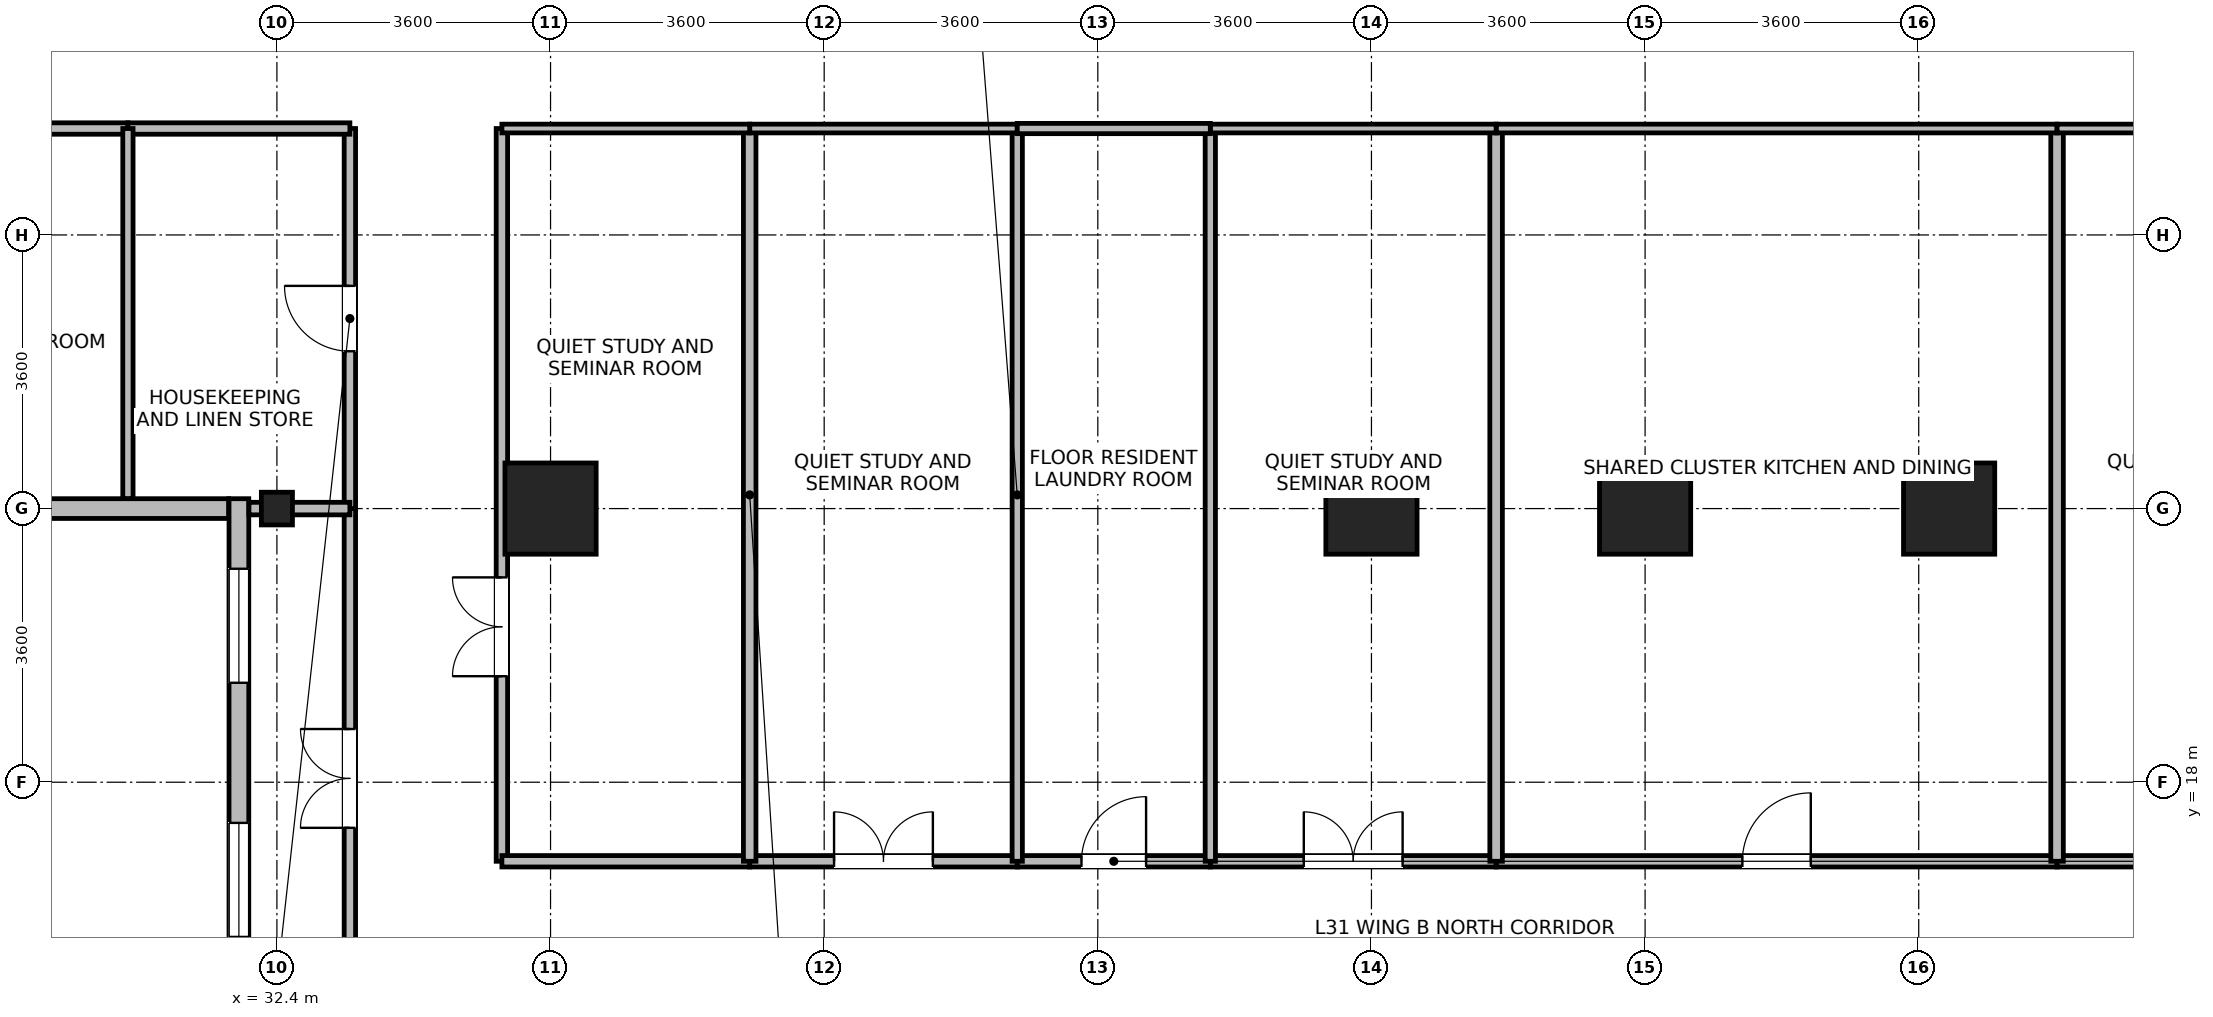
"""IFC4 building model, lengths in metres.
Left out: names, types, materials, properties, quantities, classifications, styles, units other than length and angle.
Written with IfcOpenShell. Run it as: python <this file> out.ifc"""

import sys

from ifc_helpers import new_model, si_unit, direction, frame, frame_2d, origin, origin_2d, place, context, subcontext, project, spatial, rectangle, i_section, extrude, source, transform, mapped, element, fill, save


model = new_model("IFC4")
c1 = context("Model", 3, precision=1e-05, world=origin(), true_north=direction((0.0, 1.0)))
c2 = subcontext(c1, "Body", "Model", "MODEL_VIEW")
j1 = project(units=[si_unit("LENGTHUNIT", "METRE"), si_unit("PLANEANGLEUNIT", "RADIAN")], contexts=[c1])
p1 = place(None, origin())
s1 = spatial("IfcSite", under=j1, at=p1, CompositionType="ELEMENT")
p2 = place(p1, origin())
s2 = spatial("IfcBuilding", under=s1, at=p2, CompositionType="ELEMENT")
p3 = place(p2, frame((0.0, 0.0, 123.0)))
s3 = spatial("IfcBuildingStorey", under=s2, at=p3, CompositionType="ELEMENT", Elevation=123.0)
m1 = source(origin(), c2, "Body", "SweptSolid", [
    extrude(rectangle(XDim=1.2, YDim=1.2, at=origin_2d()), origin(), (0.0, 0.0, 1.0), 3.7),
])
for number, where, z_axis, x_axis in (
    (1, (36.0, 21.6, 0.0), (0.0, 0.0, 1.0), (1.0, 0.0, 0.0)),
    (2, (46.8, 21.6, 0.0), (0.0, 0.0, 1.0), (1.0, 0.0, 0.0)),
    (3, (50.4, 21.6, 0.0), (0.0, 0.0, 1.0), (1.0, 0.0, 0.0)),
    (4, (54.4, 21.6, 0.0), (0.0, 0.0, 1.0), (1.0, 0.0, 0.0)),
):
    element("IfcColumn", number, at=place(p3, frame(where, z_axis=z_axis, x_axis=x_axis)), inside=s3, PredefinedType="COLUMN", context=c2, shape_type="MappedRepresentation", body=[
        mapped(m1, transform((0.0, 0.0, 0.0), x_axis=(1.0, 0.0, 0.0), y_axis=(0.0, 1.0, 0.0), z_axis=(0.0, 0.0, 1.0), scale=1.0)),
    ])
m2 = source(origin(), c2, "Body", "SweptSolid", [
    extrude(i_section(OverallWidth=0.409, OverallDepth=0.43, WebThickness=0.024, FlangeThickness=0.033, FilletRadius=0.015, at=origin_2d()), origin(), (0.0, 0.0, 1.0), 3.7),
])
p4 = place(p3, frame((32.4, 21.6, 0.0), z_axis=(0.0, 0.0, 1.0), x_axis=(1.0, 0.0, 0.0)))
e5 = element("IfcColumn", 5, at=p4, inside=s3, PredefinedType="COLUMN", context=c2, shape_type="MappedRepresentation", body=[
    mapped(m2, transform((0.0, 0.0, 0.0), x_axis=(1.0, 0.0, 0.0), y_axis=(0.0, 1.0, 0.0), z_axis=(0.0, 0.0, 1.0), scale=1.0)),
])
p5 = place(p3, frame((31.765, 21.6, 0.0), z_axis=(0.0, 0.0, 1.0), x_axis=(-1.0, 0.0, 0.0)))
e6 = element("IfcWall", 6, at=p5, inside=s3, PredefinedType="STANDARD", context=c2, shape_type="SweptSolid", body=[
    extrude(rectangle(XDim=2.364, YDim=0.26, at=frame_2d((1.182, 0.0))), origin(), (0.0, 0.0, 1.0), 2.98),
])
p6 = place(p3, frame((31.9, 1.67, 0.0), z_axis=(0.0, 0.0, 1.0), x_axis=(0.0, 1.0, 0.0)))
e7 = element("IfcWall", 7, at=p6, inside=s3, PredefinedType="STANDARD", context=c2, shape_type="SweptSolid", body=[
    extrude(rectangle(XDim=20.06, YDim=0.26, at=frame_2d((10.03, 0.0))), origin(), (0.0, 0.0, 1.0), 3.43),
])
p7 = place(p6, frame((0.922, 0.0, 0.85)))
e8 = element("IfcOpeningElement", 8, at=p7, cuts=e7, PredefinedType="OPENING", context=c2, shape_type="SweptSolid", body=[
    extrude(rectangle(XDim=1.5, YDim=1.85, at=frame_2d((0.75, 0.925))), frame((0.0, 0.14, 0.0), z_axis=(0.0, -1.0, 0.0), x_axis=(1.0, 0.0, 0.0)), (0.0, 0.0, 1.0), 0.28),
])
p8 = place(p6, frame((7.608, 0.0, 0.85)))
e9 = element("IfcOpeningElement", 9, at=p8, cuts=e7, PredefinedType="OPENING", context=c2, shape_type="SweptSolid", body=[
    extrude(rectangle(XDim=1.5, YDim=1.85, at=frame_2d((0.75, 0.925))), frame((0.0, 0.14, 0.0), z_axis=(0.0, -1.0, 0.0), x_axis=(1.0, 0.0, 0.0)), (0.0, 0.0, 1.0), 0.28),
])
p9 = place(p6, frame((10.952, 0.0, 0.85)))
e10 = element("IfcOpeningElement", 10, at=p9, cuts=e7, PredefinedType="OPENING", context=c2, shape_type="SweptSolid", body=[
    extrude(rectangle(XDim=1.5, YDim=1.85, at=frame_2d((0.75, 0.925))), frame((0.0, 0.14, 0.0), z_axis=(0.0, -1.0, 0.0), x_axis=(1.0, 0.0, 0.0)), (0.0, 0.0, 1.0), 0.28),
])
p10 = place(p6, frame((14.295, 0.0, 0.85)))
e11 = element("IfcOpeningElement", 11, at=p10, cuts=e7, PredefinedType="OPENING", context=c2, shape_type="SweptSolid", body=[
    extrude(rectangle(XDim=1.5, YDim=1.85, at=frame_2d((0.75, 0.925))), frame((0.0, 0.14, 0.0), z_axis=(0.0, -1.0, 0.0), x_axis=(1.0, 0.0, 0.0)), (0.0, 0.0, 1.0), 0.28),
])
p11 = place(p6, frame((17.638, 0.0, 0.85)))
e12 = element("IfcOpeningElement", 12, at=p11, cuts=e7, PredefinedType="OPENING", context=c2, shape_type="SweptSolid", body=[
    extrude(rectangle(XDim=1.5, YDim=1.85, at=frame_2d((0.75, 0.925))), frame((0.0, 0.14, 0.0), z_axis=(0.0, -1.0, 0.0), x_axis=(1.0, 0.0, 0.0)), (0.0, 0.0, 1.0), 0.28),
])
p12 = place(p3, frame((35.36, 16.96, 0.0), z_axis=(0.0, 0.0, 1.0), x_axis=(0.0, 1.0, 0.0)))
e13 = element("IfcWall", 13, at=p12, inside=s3, PredefinedType="PARTITIONING", context=c2, shape_type="SweptSolid", body=[
    extrude(rectangle(XDim=9.64, YDim=0.15, at=frame_2d((4.82, 0.0))), origin(), (0.0, 0.0, 1.0), 3.43),
])
p13 = place(p12, frame((2.435, 0.0, 0.0)))
e14 = element("IfcOpeningElement", 14, at=p13, cuts=e13, PredefinedType="OPENING", context=c2, shape_type="SweptSolid", body=[
    extrude(rectangle(XDim=1.3, YDim=2.12, at=frame_2d((0.65, 1.06))), frame((0.0, 0.085, 0.0), z_axis=(0.0, -1.0, 0.0), x_axis=(1.0, 0.0, 0.0)), (0.0, 0.0, 1.0), 0.17),
])
p14 = place(p3, frame((48.44, 16.96, 0.0), z_axis=(0.0, 0.0, 1.0), x_axis=(1.0, 0.0, 0.0)))
e15 = element("IfcWall", 15, at=p14, inside=s3, PredefinedType="PARTITIONING", context=c2, shape_type="SweptSolid", body=[
    extrude(rectangle(XDim=7.38, YDim=0.15, at=frame_2d((3.69, 0.0))), origin(), (0.0, 0.0, 1.0), 3.43),
])
p15 = place(p14, frame((3.24, 0.0, 0.0)))
e16 = element("IfcOpeningElement", 16, at=p15, cuts=e15, PredefinedType="OPENING", context=c2, shape_type="SweptSolid", body=[
    extrude(rectangle(XDim=0.9, YDim=2.08, at=frame_2d((0.45, 1.04))), frame((0.0, 0.085, 0.0), z_axis=(0.0, -1.0, 0.0), x_axis=(1.0, 0.0, 0.0)), (0.0, 0.0, 1.0), 0.17),
])
p16 = place(p3, frame((33.36, 14.5, 0.0), z_axis=(0.0, 0.0, 1.0), x_axis=(0.0, 1.0, 0.0)))
e17 = element("IfcWall", 17, at=p16, inside=s3, PredefinedType="PARTITIONING", context=c2, shape_type="SweptSolid", body=[
    extrude(rectangle(XDim=7.1, YDim=0.15, at=frame_2d((3.55, 0.0))), origin(), (0.0, 0.0, 1.0), 3.43),
])
p17 = place(p16, frame((2.9, 0.0, 0.0)))
e18 = element("IfcOpeningElement", 18, at=p17, cuts=e17, PredefinedType="OPENING", context=c2, shape_type="SweptSolid", body=[
    extrude(rectangle(XDim=1.3, YDim=2.12, at=frame_2d((0.65, 1.06))), frame((0.0, 0.085, 0.0), z_axis=(0.0, -1.0, 0.0), x_axis=(1.0, 0.0, 0.0)), (0.0, 0.0, 1.0), 0.17),
])
p18 = place(p3, frame((33.36, 21.6, 0.0), z_axis=(0.0, 0.0, 1.0), x_axis=(0.0, 1.0, 0.0)))
e19 = element("IfcWall", 19, at=p18, inside=s3, PredefinedType="PARTITIONING", context=c2, shape_type="SweptSolid", body=[
    extrude(rectangle(XDim=5.0, YDim=0.15, at=frame_2d((2.5, 0.0))), origin(), (0.0, 0.0, 1.0), 3.43),
])
p19 = place(p18, frame((2.07, 0.0, 0.0)))
e20 = element("IfcOpeningElement", 20, at=p19, cuts=e19, PredefinedType="OPENING", context=c2, shape_type="SweptSolid", body=[
    extrude(rectangle(XDim=0.86, YDim=2.02, at=frame_2d((0.43, 1.01))), frame((0.0, 0.085, 0.0), z_axis=(0.0, -1.0, 0.0), x_axis=(1.0, 0.0, 0.0)), (0.0, 0.0, 1.0), 0.17),
])
p20 = place(p3, frame((25.46, 26.6, 0.0), z_axis=(0.0, 0.0, 1.0), x_axis=(1.0, 0.0, 0.0)))
e21 = element("IfcWall", 21, at=p20, inside=s3, PredefinedType="PARTITIONING", context=c2, shape_type="SweptSolid", body=[
    extrude(rectangle(XDim=4.98, YDim=0.15, at=frame_2d((2.49, 0.0))), origin(), (0.0, 0.0, 1.0), 3.43),
])
p21 = place(p20, frame((2.065, 0.0, 0.0)))
e22 = element("IfcOpeningElement", 22, at=p21, cuts=e21, PredefinedType="OPENING", context=c2, shape_type="SweptSolid", body=[
    extrude(rectangle(XDim=0.85, YDim=2.04, at=frame_2d((0.425, 1.02))), frame((0.0, 0.085, 0.0), z_axis=(0.0, -1.0, 0.0), x_axis=(1.0, 0.0, 0.0)), (0.0, 0.0, 1.0), 0.17),
])
p22 = place(p3, frame((55.82, 16.96, 0.0), z_axis=(0.0, 0.0, 1.0), x_axis=(1.0, 0.0, 0.0)))
e23 = element("IfcWall", 23, at=p22, inside=s3, PredefinedType="PARTITIONING", context=c2, shape_type="SweptSolid", body=[
    extrude(rectangle(XDim=4.748, YDim=0.15, at=frame_2d((2.374, 0.0))), origin(), (0.0, 0.0, 1.0), 3.43),
])
p23 = place(p22, frame((1.724, 0.0, 0.0)))
e24 = element("IfcOpeningElement", 24, at=p23, cuts=e23, PredefinedType="OPENING", context=c2, shape_type="SweptSolid", body=[
    extrude(rectangle(XDim=1.3, YDim=2.12, at=frame_2d((0.65, 1.06))), frame((0.0, 0.085, 0.0), z_axis=(0.0, -1.0, 0.0), x_axis=(1.0, 0.0, 0.0)), (0.0, 0.0, 1.0), 0.17),
])
p24 = place(p3, frame((44.68, 16.96, 0.0), z_axis=(0.0, 0.0, 1.0), x_axis=(1.0, 0.0, 0.0)))
e25 = element("IfcWall", 25, at=p24, inside=s3, PredefinedType="PARTITIONING", context=c2, shape_type="SweptSolid", body=[
    extrude(rectangle(XDim=3.76, YDim=0.15, at=frame_2d((1.88, 0.0))), origin(), (0.0, 0.0, 1.0), 3.43),
])
p25 = place(p24, frame((1.23, 0.0, 0.0)))
e26 = element("IfcOpeningElement", 26, at=p25, cuts=e25, PredefinedType="OPENING", context=c2, shape_type="SweptSolid", body=[
    extrude(rectangle(XDim=1.3, YDim=2.12, at=frame_2d((0.65, 1.06))), frame((0.0, 0.085, 0.0), z_axis=(0.0, -1.0, 0.0), x_axis=(1.0, 0.0, 0.0)), (0.0, 0.0, 1.0), 0.17),
])
p26 = place(p3, frame((38.62, 16.96, 0.0), z_axis=(0.0, 0.0, 1.0), x_axis=(1.0, 0.0, 0.0)))
e27 = element("IfcWall", 27, at=p26, inside=s3, PredefinedType="PARTITIONING", context=c2, shape_type="SweptSolid", body=[
    extrude(rectangle(XDim=3.52, YDim=0.15, at=frame_2d((1.76, 0.0))), origin(), (0.0, 0.0, 1.0), 3.43),
])
p27 = place(p26, frame((1.11, 0.0, 0.0)))
e28 = element("IfcOpeningElement", 28, at=p27, cuts=e27, PredefinedType="OPENING", context=c2, shape_type="SweptSolid", body=[
    extrude(rectangle(XDim=1.3, YDim=2.12, at=frame_2d((0.65, 1.06))), frame((0.0, 0.085, 0.0), z_axis=(0.0, -1.0, 0.0), x_axis=(1.0, 0.0, 0.0)), (0.0, 0.0, 1.0), 0.17),
])
p28 = place(p3, frame((35.36, 16.96, 0.0), z_axis=(0.0, 0.0, 1.0), x_axis=(1.0, 0.0, 0.0)))
e29 = element("IfcWall", 29, at=p28, inside=s3, PredefinedType="PARTITIONING", context=c2, shape_type="SweptSolid", body=[
    extrude(rectangle(XDim=3.26, YDim=0.15, at=frame_2d((1.63, 0.0))), origin(), (0.0, 0.0, 1.0), 3.43),
])
p29 = place(p3, frame((30.44, 26.6, 0.0), z_axis=(0.0, 0.0, 1.0), x_axis=(1.0, 0.0, 0.0)))
e30 = element("IfcWall", 30, at=p29, inside=s3, PredefinedType="PARTITIONING", context=c2, shape_type="SweptSolid", body=[
    extrude(rectangle(XDim=2.92, YDim=0.15, at=frame_2d((1.46, 0.0))), origin(), (0.0, 0.0, 1.0), 3.43),
])
p30 = place(p3, frame((42.14, 16.96, 0.0), z_axis=(0.0, 0.0, 1.0), x_axis=(1.0, 0.0, 0.0)))
e31 = element("IfcWall", 31, at=p30, inside=s3, PredefinedType="PARTITIONING", context=c2, shape_type="SweptSolid", body=[
    extrude(rectangle(XDim=2.54, YDim=0.15, at=frame_2d((1.27, 0.0))), origin(), (0.0, 0.0, 1.0), 3.43),
])
p31 = place(p30, frame((0.845, 0.0, 0.0)))
e32 = element("IfcOpeningElement", 32, at=p31, cuts=e31, PredefinedType="OPENING", context=c2, shape_type="SweptSolid", body=[
    extrude(rectangle(XDim=0.85, YDim=2.04, at=frame_2d((0.425, 1.02))), frame((0.0, 0.085, 0.0), z_axis=(0.0, -1.0, 0.0), x_axis=(1.0, 0.0, 0.0)), (0.0, 0.0, 1.0), 0.17),
])
p32 = place(p3, frame((38.62, 16.96, 0.0), z_axis=(0.0, 0.0, 1.0), x_axis=(0.0, 1.0, 0.0)))
e33 = element("IfcWall", 33, at=p32, inside=s3, PredefinedType="PARTITIONING", context=c2, shape_type="SweptSolid", body=[
    extrude(rectangle(XDim=9.64, YDim=0.165, at=frame_2d((4.82, 0.0))), origin(), (0.0, 0.0, 1.0), 3.43),
])
for number, where, z_axis, x_axis in (
    (34, (42.14, 16.96, 0.0), (0.0, 0.0, 1.0), (0.0, 1.0, 0.0)),
    (35, (44.68, 16.96, 0.0), (0.0, 0.0, 1.0), (0.0, 1.0, 0.0)),
):
    element("IfcWall", number, at=place(p3, frame(where, z_axis=z_axis, x_axis=x_axis)), inside=s3, PredefinedType="PARTITIONING", context=c2, shape_type="SweptSolid", body=[
        extrude(rectangle(XDim=9.64, YDim=0.135, at=frame_2d((4.82, 0.0))), origin(), (0.0, 0.0, 1.0), 3.43),
    ])
for number, where, z_axis, x_axis in (
    (36, (48.44, 16.96, 0.0), (0.0, 0.0, 1.0), (0.0, 1.0, 0.0)),
    (37, (55.82, 16.96, 0.0), (0.0, 0.0, 1.0), (0.0, 1.0, 0.0)),
):
    element("IfcWall", number, at=place(p3, frame(where, z_axis=z_axis, x_axis=x_axis)), inside=s3, PredefinedType="PARTITIONING", context=c2, shape_type="SweptSolid", body=[
        extrude(rectangle(XDim=9.64, YDim=0.165, at=frame_2d((4.82, 0.0))), origin(), (0.0, 0.0, 1.0), 3.43),
    ])
p33 = place(p3, frame((48.44, 26.6, 0.0), z_axis=(0.0, 0.0, 1.0), x_axis=(1.0, 0.0, 0.0)))
e38 = element("IfcWall", 38, at=p33, inside=s3, PredefinedType="PARTITIONING", context=c2, shape_type="SweptSolid", body=[
    extrude(rectangle(XDim=7.38, YDim=0.115, at=frame_2d((3.69, 0.0))), origin(), (0.0, 0.0, 1.0), 3.43),
])
p34 = place(p3, frame((30.44, 21.732, 0.0), z_axis=(0.0, 0.0, 1.0), x_axis=(0.0, 1.0, 0.0)))
e39 = element("IfcWall", 39, at=p34, inside=s3, PredefinedType="PARTITIONING", context=c2, shape_type="SweptSolid", body=[
    extrude(rectangle(XDim=4.868, YDim=0.135, at=frame_2d((2.434, 0.0))), origin(), (0.0, 0.0, 1.0), 3.43),
])
p35 = place(p3, frame((55.82, 26.6, 0.0), z_axis=(0.0, 0.0, 1.0), x_axis=(1.0, 0.0, 0.0)))
e40 = element("IfcWall", 40, at=p35, inside=s3, PredefinedType="PARTITIONING", context=c2, shape_type="SweptSolid", body=[
    extrude(rectangle(XDim=4.748, YDim=0.115, at=frame_2d((2.374, 0.0))), origin(), (0.0, 0.0, 1.0), 3.43),
])
p36 = place(p3, frame((44.68, 26.6, 0.0), z_axis=(0.0, 0.0, 1.0), x_axis=(1.0, 0.0, 0.0)))
e41 = element("IfcWall", 41, at=p36, inside=s3, PredefinedType="PARTITIONING", context=c2, shape_type="SweptSolid", body=[
    extrude(rectangle(XDim=3.76, YDim=0.115, at=frame_2d((1.88, 0.0))), origin(), (0.0, 0.0, 1.0), 3.43),
])
p37 = place(p3, frame((38.62, 26.6, 0.0), z_axis=(0.0, 0.0, 1.0), x_axis=(1.0, 0.0, 0.0)))
e42 = element("IfcWall", 42, at=p37, inside=s3, PredefinedType="PARTITIONING", context=c2, shape_type="SweptSolid", body=[
    extrude(rectangle(XDim=3.52, YDim=0.115, at=frame_2d((1.76, 0.0))), origin(), (0.0, 0.0, 1.0), 3.43),
])
p38 = place(p3, frame((35.36, 26.6, 0.0), z_axis=(0.0, 0.0, 1.0), x_axis=(1.0, 0.0, 0.0)))
e43 = element("IfcWall", 43, at=p38, inside=s3, PredefinedType="PARTITIONING", context=c2, shape_type="SweptSolid", body=[
    extrude(rectangle(XDim=3.26, YDim=0.115, at=frame_2d((1.63, 0.0))), origin(), (0.0, 0.0, 1.0), 3.43),
])
p39 = place(p3, frame((42.14, 26.6, 0.0), z_axis=(0.0, 0.0, 1.0), x_axis=(1.0, 0.0, 0.0)))
e44 = element("IfcWall", 44, at=p39, inside=s3, PredefinedType="PARTITIONING", context=c2, shape_type="SweptSolid", body=[
    extrude(rectangle(XDim=2.54, YDim=0.135, at=frame_2d((1.27, 0.0))), origin(), (0.0, 0.0, 1.0), 3.43),
])
p40 = place(p3, frame((32.032, 21.6, 0.0), z_axis=(0.0, 0.0, 1.0), x_axis=(1.0, 0.0, 0.0)))
e45 = element("IfcWall", 45, at=p40, inside=s3, PredefinedType="PARTITIONING", context=c2, shape_type="SweptSolid", body=[
    extrude(rectangle(XDim=1.328, YDim=0.165, at=frame_2d((0.664, 0.0))), origin(), (0.0, 0.0, 1.0), 2.98),
])
p41 = place(p10, origin())
e46 = element("IfcWindow", 46, at=p41, inside=s3, PartitioningType="SINGLE_PANEL", PredefinedType="WINDOW", context=c2, shape_type="SweptSolid", body=[
    extrude(rectangle(XDim=1.5, YDim=1.85, at=frame_2d((0.75, 0.925))), frame((0.0, 0.03, 0.0), z_axis=(0.0, -1.0, 0.0), x_axis=(1.0, 0.0, 0.0)), (0.0, 0.0, 1.0), 0.06),
])
fill(e11, e46)
p42 = place(p11, origin())
e47 = element("IfcWindow", 47, at=p42, inside=s3, PartitioningType="SINGLE_PANEL", PredefinedType="WINDOW", context=c2, shape_type="SweptSolid", body=[
    extrude(rectangle(XDim=1.5, YDim=1.85, at=frame_2d((0.75, 0.925))), frame((0.0, 0.03, 0.0), z_axis=(0.0, -1.0, 0.0), x_axis=(1.0, 0.0, 0.0)), (0.0, 0.0, 1.0), 0.06),
])
fill(e12, e47)
p43 = place(p13, origin())
e48 = element("IfcDoor", 48, at=p43, inside=s3, OperationType="DOUBLE_DOOR_SINGLE_SWING", PredefinedType="DOOR", context=c2, shape_type="SweptSolid", body=[
    extrude(rectangle(XDim=1.3, YDim=2.12, at=frame_2d((0.65, 1.06))), frame((0.0, 0.025, 0.0), z_axis=(0.0, -1.0, 0.0), x_axis=(1.0, 0.0, 0.0)), (0.0, 0.0, 1.0), 0.05),
])
fill(e14, e48)
p44 = place(p15, origin())
e49 = element("IfcDoor", 49, at=p44, inside=s3, OperationType="SINGLE_SWING_RIGHT", PredefinedType="DOOR", context=c2, shape_type="SweptSolid", body=[
    extrude(rectangle(XDim=0.9, YDim=2.08, at=frame_2d((0.45, 1.04))), frame((0.0, 0.025, 0.0), z_axis=(0.0, -1.0, 0.0), x_axis=(1.0, 0.0, 0.0)), (0.0, 0.0, 1.0), 0.05),
])
fill(e16, e49)
p45 = place(p17, origin())
e50 = element("IfcDoor", 50, at=p45, inside=s3, OperationType="DOUBLE_DOOR_SINGLE_SWING", PredefinedType="DOOR", context=c2, shape_type="SweptSolid", body=[
    extrude(rectangle(XDim=1.3, YDim=2.12, at=frame_2d((0.65, 1.06))), frame((0.0, 0.025, 0.0), z_axis=(0.0, -1.0, 0.0), x_axis=(1.0, 0.0, 0.0)), (0.0, 0.0, 1.0), 0.05),
])
fill(e18, e50)
p46 = place(p19, origin())
e51 = element("IfcDoor", 51, at=p46, inside=s3, OperationType="SINGLE_SWING_RIGHT", PredefinedType="DOOR", context=c2, shape_type="SweptSolid", body=[
    extrude(rectangle(XDim=0.86, YDim=2.02, at=frame_2d((0.43, 1.01))), frame((0.0, 0.025, 0.0), z_axis=(0.0, -1.0, 0.0), x_axis=(1.0, 0.0, 0.0)), (0.0, 0.0, 1.0), 0.05),
])
fill(e20, e51)
p47 = place(p25, origin())
e52 = element("IfcDoor", 52, at=p47, inside=s3, OperationType="DOUBLE_DOOR_SINGLE_SWING", PredefinedType="DOOR", context=c2, shape_type="SweptSolid", body=[
    extrude(rectangle(XDim=1.3, YDim=2.12, at=frame_2d((0.65, 1.06))), frame((0.0, 0.025, 0.0), z_axis=(0.0, -1.0, 0.0), x_axis=(1.0, 0.0, 0.0)), (0.0, 0.0, 1.0), 0.05),
])
fill(e26, e52)
p48 = place(p27, origin())
e53 = element("IfcDoor", 53, at=p48, inside=s3, OperationType="DOUBLE_DOOR_SINGLE_SWING", PredefinedType="DOOR", context=c2, shape_type="SweptSolid", body=[
    extrude(rectangle(XDim=1.3, YDim=2.12, at=frame_2d((0.65, 1.06))), frame((0.0, 0.025, 0.0), z_axis=(0.0, -1.0, 0.0), x_axis=(1.0, 0.0, 0.0)), (0.0, 0.0, 1.0), 0.05),
])
fill(e28, e53)
p49 = place(p31, origin())
e54 = element("IfcDoor", 54, at=p49, inside=s3, OperationType="SINGLE_SWING_RIGHT", PredefinedType="DOOR", context=c2, shape_type="SweptSolid", body=[
    extrude(rectangle(XDim=0.85, YDim=2.04, at=frame_2d((0.425, 1.02))), frame((0.0, 0.025, 0.0), z_axis=(0.0, -1.0, 0.0), x_axis=(1.0, 0.0, 0.0)), (0.0, 0.0, 1.0), 0.05),
])
fill(e32, e54)
save(model, sys.argv[1])
